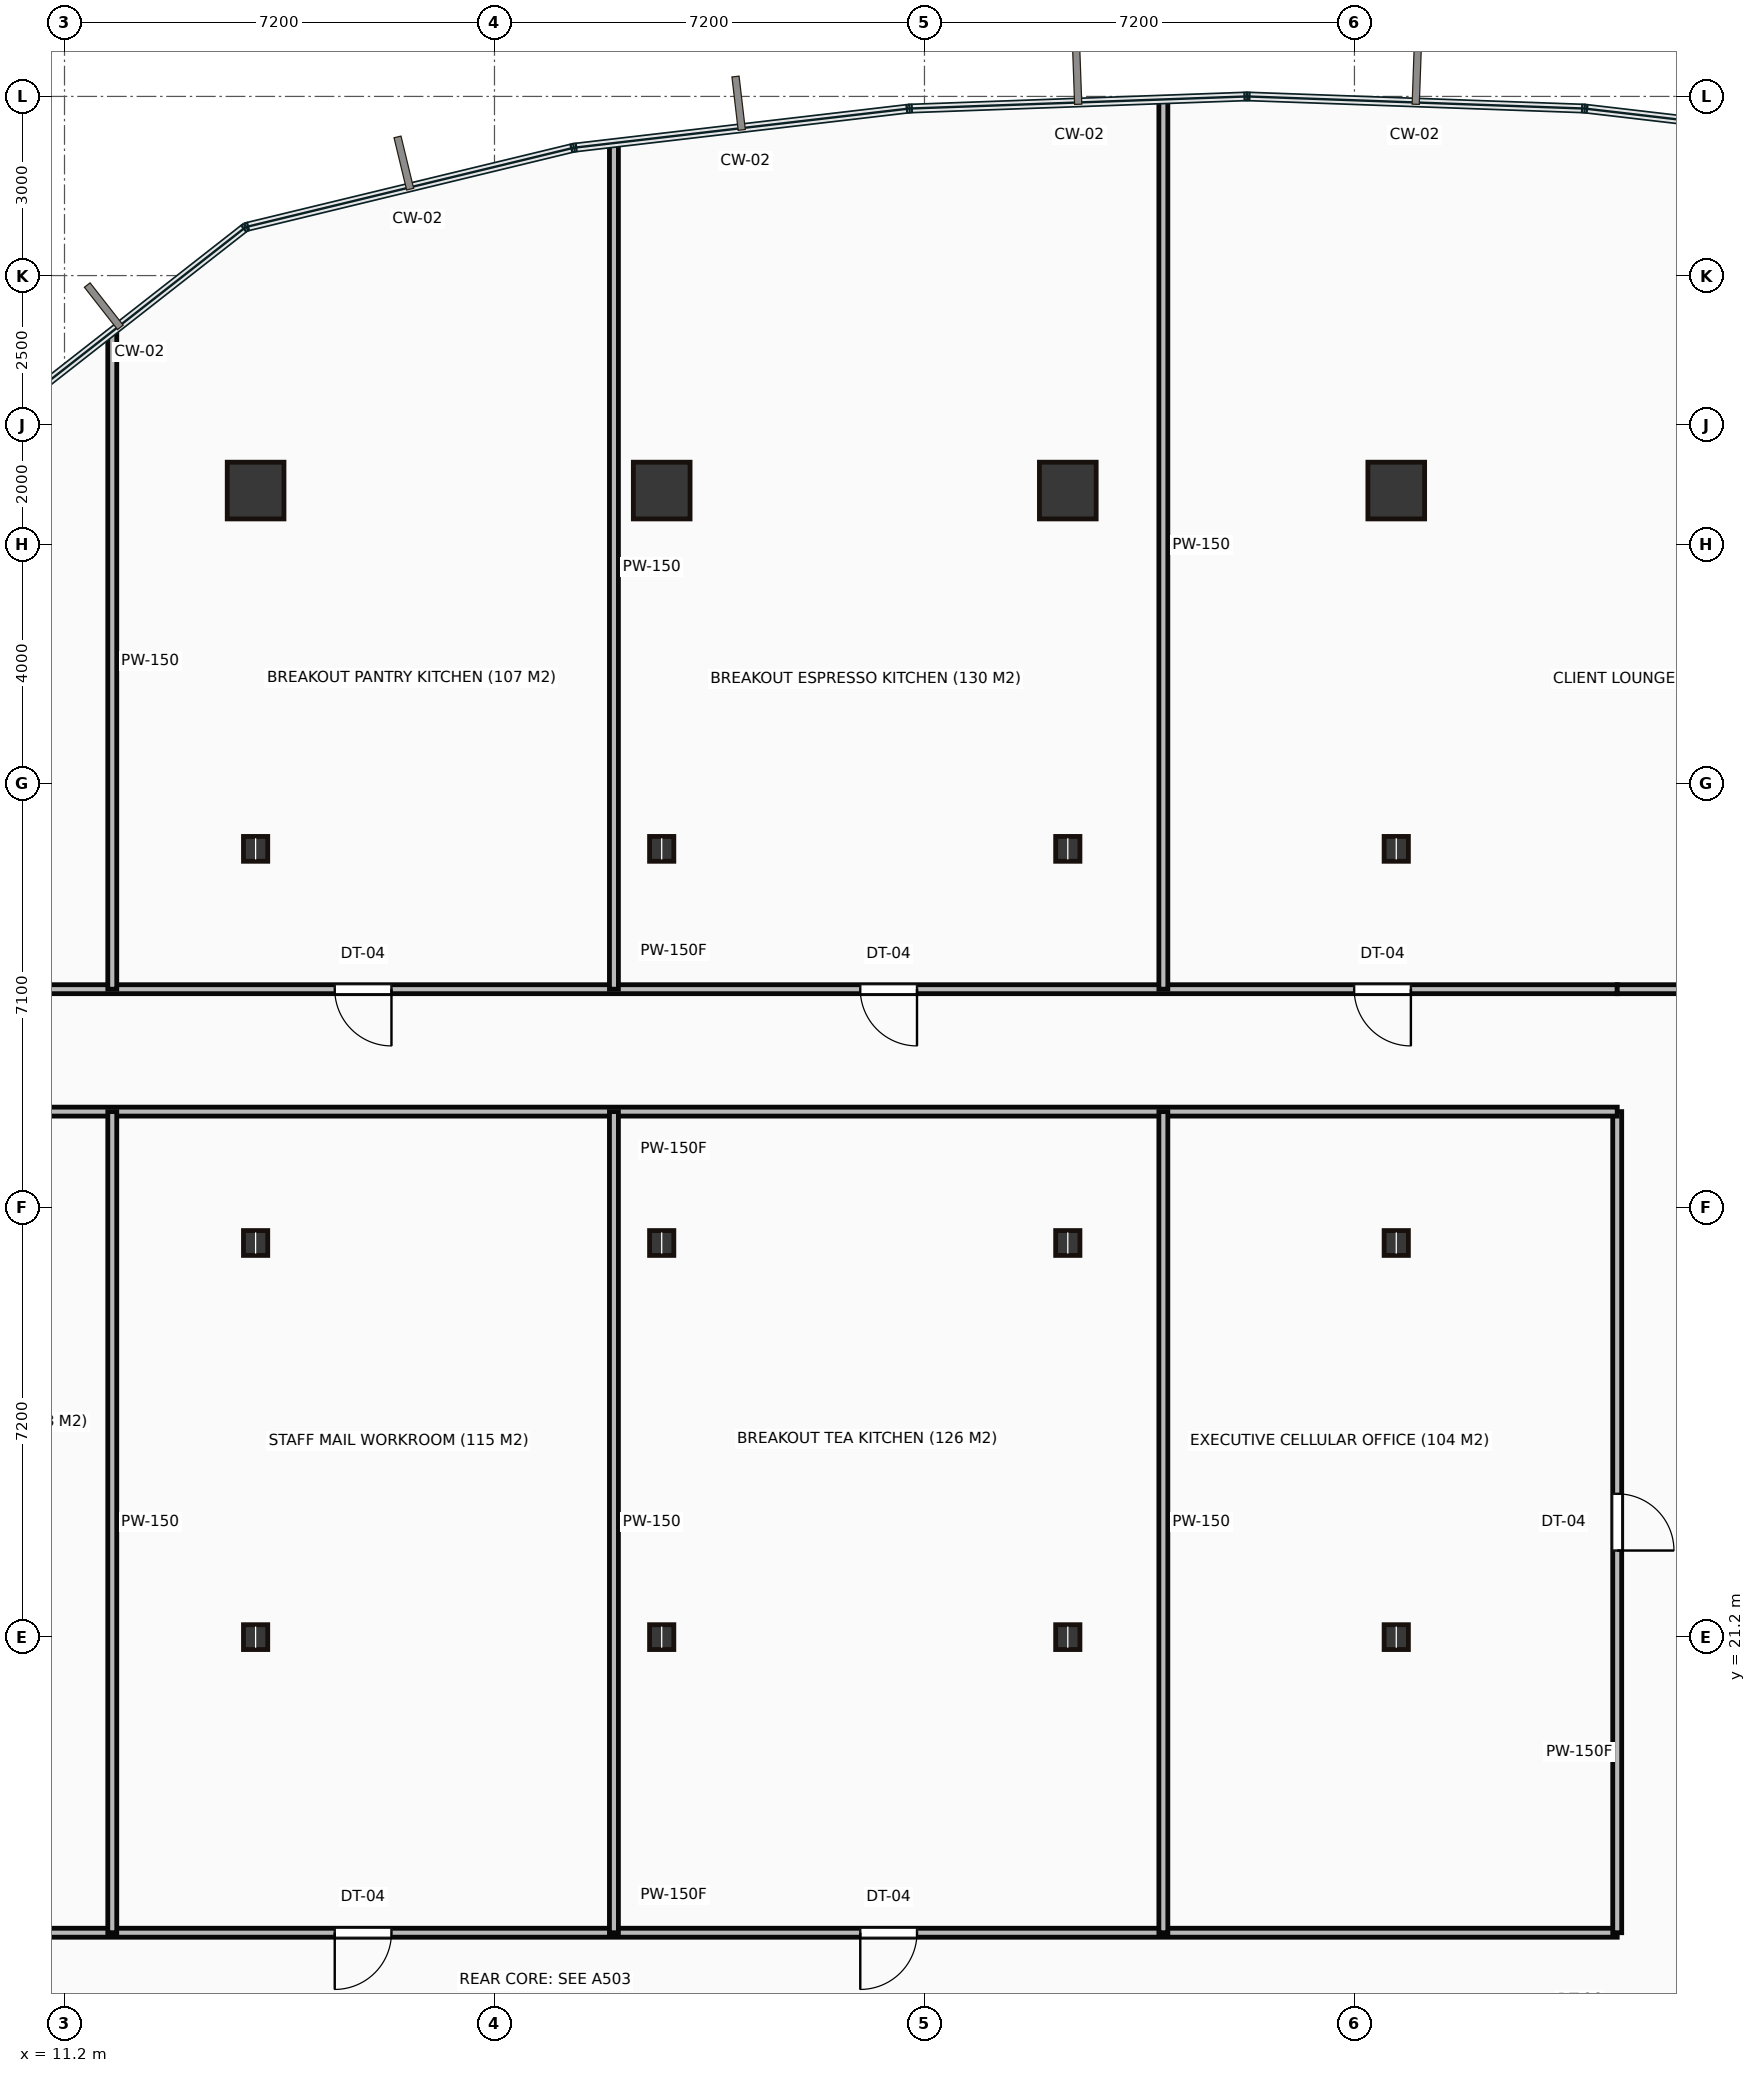
"""IFC4 building model, lengths in metres.
Left out: names, types, materials, properties, quantities, classifications, styles, units other than length and angle.
Written with IfcOpenShell. Run it as: python <this file> out.ifc"""

import sys

from ifc_helpers import new_model, si_unit, direction, frame, frame_2d, origin, origin_2d, place, context, subcontext, project, spatial, rectangle, hollow_rectangle, i_section, extrude, source, transform, mapped, element, fill, save


model = new_model("IFC4")
c1 = context("Model", 3, precision=1e-05, world=origin(), true_north=direction((0.0, 1.0)))
c2 = subcontext(c1, "Body", "Model", "MODEL_VIEW")
j1 = project(units=[si_unit("LENGTHUNIT", "METRE"), si_unit("PLANEANGLEUNIT", "RADIAN")], contexts=[c1])
p1 = place(None, origin())
s1 = spatial("IfcSite", under=j1, at=p1, CompositionType="ELEMENT")
p2 = place(p1, origin())
s2 = spatial("IfcBuilding", under=s1, at=p2, CompositionType="ELEMENT")
p3 = place(p2, frame((0.0, 0.0, 65.35)))
s3 = spatial("IfcBuildingStorey", under=s2, at=p3, CompositionType="ELEMENT", Elevation=65.35)
m1 = source(origin(), c2, "Body", "SweptSolid", [
    extrude(i_section(OverallWidth=0.406, OverallDepth=0.416, WebThickness=0.03, FlangeThickness=0.048, at=origin_2d()), origin(), (0.0, 0.0, 1.0), 3.65),
])
for number, where, z_axis, x_axis in (
    (1, (14.4, 21.2, 0.0), (0.0, 0.0, 1.0), (1.0, 0.0, 0.0)),
    (2, (14.4, 27.8, 0.0), (0.0, 0.0, 1.0), (1.0, 0.0, 0.0)),
    (3, (14.4, 34.4, 0.0), (0.0, 0.0, 1.0), (1.0, 0.0, 0.0)),
):
    element("IfcColumn", number, at=place(p3, frame(where, z_axis=z_axis, x_axis=x_axis)), inside=s3, PredefinedType="COLUMN", context=c2, shape_type="MappedRepresentation", body=[
        mapped(m1, transform((0.0, 0.0, 0.0))),
    ])
m2 = source(origin(), c2, "Body", "SweptSolid", [
    extrude(hollow_rectangle(XDim=0.95, YDim=0.95, WallThickness=0.045, at=origin_2d()), origin(), (0.0, 0.0, 1.0), 3.65),
])
p4 = place(p3, frame((14.4, 40.4, 0.0), z_axis=(0.0, 0.0, 1.0), x_axis=(1.0, 0.0, 0.0)))
e4 = element("IfcColumn", 4, at=p4, inside=s3, PredefinedType="COLUMN", context=c2, shape_type="MappedRepresentation", body=[
    mapped(m2, transform((0.0, 0.0, 0.0))),
])
for number, where, z_axis, x_axis in (
    (5, (21.2, 21.2, 0.0), (0.0, 0.0, 1.0), (1.0, 0.0, 0.0)),
    (6, (21.2, 27.8, 0.0), (0.0, 0.0, 1.0), (1.0, 0.0, 0.0)),
    (7, (21.2, 34.4, 0.0), (0.0, 0.0, 1.0), (1.0, 0.0, 0.0)),
):
    element("IfcColumn", number, at=place(p3, frame(where, z_axis=z_axis, x_axis=x_axis)), inside=s3, PredefinedType="COLUMN", context=c2, shape_type="MappedRepresentation", body=[
        mapped(m1, transform((0.0, 0.0, 0.0))),
    ])
p5 = place(p3, frame((21.2, 40.4, 0.0), z_axis=(0.0, 0.0, 1.0), x_axis=(1.0, 0.0, 0.0)))
e8 = element("IfcColumn", 8, at=p5, inside=s3, PredefinedType="COLUMN", context=c2, shape_type="MappedRepresentation", body=[
    mapped(m2, transform((0.0, 0.0, 0.0))),
])
for number, where, z_axis, x_axis in (
    (9, (28.0, 21.2, 0.0), (0.0, 0.0, 1.0), (1.0, 0.0, 0.0)),
    (10, (28.0, 27.8, 0.0), (0.0, 0.0, 1.0), (1.0, 0.0, 0.0)),
    (11, (28.0, 34.4, 0.0), (0.0, 0.0, 1.0), (1.0, 0.0, 0.0)),
):
    element("IfcColumn", number, at=place(p3, frame(where, z_axis=z_axis, x_axis=x_axis)), inside=s3, PredefinedType="COLUMN", context=c2, shape_type="MappedRepresentation", body=[
        mapped(m1, transform((0.0, 0.0, 0.0))),
    ])
p6 = place(p3, frame((28.0, 40.4, 0.0), z_axis=(0.0, 0.0, 1.0), x_axis=(1.0, 0.0, 0.0)))
e12 = element("IfcColumn", 12, at=p6, inside=s3, PredefinedType="COLUMN", context=c2, shape_type="MappedRepresentation", body=[
    mapped(m2, transform((0.0, 0.0, 0.0))),
])
for number, where, z_axis, x_axis in (
    (13, (33.5, 21.2, 0.0), (0.0, 0.0, 1.0), (1.0, 0.0, 0.0)),
    (14, (33.5, 27.8, 0.0), (0.0, 0.0, 1.0), (1.0, 0.0, 0.0)),
    (15, (33.5, 34.4, 0.0), (0.0, 0.0, 1.0), (1.0, 0.0, 0.0)),
):
    element("IfcColumn", number, at=place(p3, frame(where, z_axis=z_axis, x_axis=x_axis)), inside=s3, PredefinedType="COLUMN", context=c2, shape_type="MappedRepresentation", body=[
        mapped(m1, transform((0.0, 0.0, 0.0))),
    ])
p7 = place(p3, frame((33.5, 40.4, 0.0), z_axis=(0.0, 0.0, 1.0), x_axis=(1.0, 0.0, 0.0)))
e16 = element("IfcColumn", 16, at=p7, inside=s3, PredefinedType="COLUMN", context=c2, shape_type="MappedRepresentation", body=[
    mapped(m2, transform((0.0, 0.0, 0.0))),
])
m3 = source(origin(), c2, "Body", "SweptSolid", [
    extrude(rectangle(XDim=31.6, YDim=0.15, at=frame_2d((15.8, 0.0))), origin(), (0.0, 0.0, 1.0), 3.4),
])
p8 = place(p3, frame((5.6, 32.05, 0.0), z_axis=(0.0, 0.0, 1.0), x_axis=(1.0, 0.0, 0.0)))
e17 = element("IfcWall", 17, at=p8, inside=s3, PredefinedType="PARTITIONING", context=c2, shape_type="MappedRepresentation", body=[
    mapped(m3, transform((0.0, 0.0, 0.0))),
])
p9 = place(p8, frame((2.855, 0.0, 0.0)))
e18 = element("IfcOpeningElement", 18, at=p9, cuts=e17, PredefinedType="OPENING", context=c2, shape_type="SweptSolid", body=[
    extrude(rectangle(XDim=0.95, YDim=2.15, at=frame_2d((0.475, 1.075))), frame((0.0, 0.085, 0.0), z_axis=(0.0, -1.0, 0.0), x_axis=(1.0, 0.0, 0.0)), (0.0, 0.0, 1.0), 0.17),
])
p10 = place(p8, frame((10.125, 0.0, 0.0)))
e19 = element("IfcOpeningElement", 19, at=p10, cuts=e17, PredefinedType="OPENING", context=c2, shape_type="SweptSolid", body=[
    extrude(rectangle(XDim=0.95, YDim=2.15, at=frame_2d((0.475, 1.075))), frame((0.0, 0.085, 0.0), z_axis=(0.0, -1.0, 0.0), x_axis=(1.0, 0.0, 0.0)), (0.0, 0.0, 1.0), 0.17),
])
p11 = place(p8, frame((18.925, 0.0, 0.0)))
e20 = element("IfcOpeningElement", 20, at=p11, cuts=e17, PredefinedType="OPENING", context=c2, shape_type="SweptSolid", body=[
    extrude(rectangle(XDim=0.95, YDim=2.15, at=frame_2d((0.475, 1.075))), frame((0.0, 0.085, 0.0), z_axis=(0.0, -1.0, 0.0), x_axis=(1.0, 0.0, 0.0)), (0.0, 0.0, 1.0), 0.17),
])
p12 = place(p8, frame((27.195, 0.0, 0.0)))
e21 = element("IfcOpeningElement", 21, at=p12, cuts=e17, PredefinedType="OPENING", context=c2, shape_type="SweptSolid", body=[
    extrude(rectangle(XDim=0.95, YDim=2.15, at=frame_2d((0.475, 1.075))), frame((0.0, 0.085, 0.0), z_axis=(0.0, -1.0, 0.0), x_axis=(1.0, 0.0, 0.0)), (0.0, 0.0, 1.0), 0.17),
])
m4 = source(origin(), c2, "Body", "SweptSolid", [
    extrude(rectangle(XDim=2.2, YDim=0.15, at=frame_2d((1.1, 0.0))), origin(), (0.0, 0.0, 1.0), 3.4),
])
p13 = place(p3, frame((37.2, 32.05, 0.0), z_axis=(0.0, 0.0, 1.0), x_axis=(1.0, 0.0, 0.0)))
e22 = element("IfcWall", 22, at=p13, inside=s3, PredefinedType="PARTITIONING", context=c2, shape_type="MappedRepresentation", body=[
    mapped(m4, transform((0.0, 0.0, 0.0))),
])
p14 = place(p3, frame((5.6, 16.25, 0.0), z_axis=(0.0, 0.0, 1.0), x_axis=(1.0, 0.0, 0.0)))
e23 = element("IfcWall", 23, at=p14, inside=s3, PredefinedType="PARTITIONING", context=c2, shape_type="MappedRepresentation", body=[
    mapped(m3, transform((0.0, 0.0, 0.0))),
])
p15 = place(p14, frame((10.125, 0.0, 0.0)))
e24 = element("IfcOpeningElement", 24, at=p15, cuts=e23, PredefinedType="OPENING", context=c2, shape_type="SweptSolid", body=[
    extrude(rectangle(XDim=0.95, YDim=2.15, at=frame_2d((0.475, 1.075))), frame((0.0, 0.085, 0.0), z_axis=(0.0, -1.0, 0.0), x_axis=(1.0, 0.0, 0.0)), (0.0, 0.0, 1.0), 0.17),
])
p16 = place(p14, frame((18.925, 0.0, 0.0)))
e25 = element("IfcOpeningElement", 25, at=p16, cuts=e23, PredefinedType="OPENING", context=c2, shape_type="SweptSolid", body=[
    extrude(rectangle(XDim=0.95, YDim=2.15, at=frame_2d((0.475, 1.075))), frame((0.0, 0.085, 0.0), z_axis=(0.0, -1.0, 0.0), x_axis=(1.0, 0.0, 0.0)), (0.0, 0.0, 1.0), 0.17),
])
m5 = source(origin(), c2, "Body", "SweptSolid", [
    extrude(rectangle(XDim=13.75, YDim=0.15, at=frame_2d((6.875, 0.0))), origin(), (0.0, 0.0, 1.0), 3.4),
])
p17 = place(p3, frame((37.2, 16.25, 0.0), z_axis=(0.0, 0.0, 1.0), x_axis=(0.0, 1.0, 0.0)))
e26 = element("IfcWall", 26, at=p17, inside=s3, PredefinedType="PARTITIONING", context=c2, shape_type="MappedRepresentation", body=[
    mapped(m5, transform((0.0, 0.0, 0.0))),
])
p18 = place(p17, frame((6.4, 0.0, 0.0)))
e27 = element("IfcOpeningElement", 27, at=p18, cuts=e26, PredefinedType="OPENING", context=c2, shape_type="SweptSolid", body=[
    extrude(rectangle(XDim=0.95, YDim=2.15, at=frame_2d((0.475, 1.075))), frame((0.0, 0.085, 0.0), z_axis=(0.0, -1.0, 0.0), x_axis=(1.0, 0.0, 0.0)), (0.0, 0.0, 1.0), 0.17),
])
m6 = source(origin(), c2, "Body", "SweptSolid", [
    extrude(rectangle(XDim=31.6, YDim=0.15, at=frame_2d((15.8, 0.0))), origin(), (0.0, 0.0, 1.0), 2.978),
])
p19 = place(p3, frame((37.2, 30.0, 0.0), z_axis=(0.0, 0.0, 1.0), x_axis=(-1.0, 0.0, 0.0)))
e28 = element("IfcWall", 28, at=p19, inside=s3, PredefinedType="PARTITIONING", context=c2, shape_type="MappedRepresentation", body=[
    mapped(m6, transform((0.0, 0.0, 0.0))),
])
p20 = place(p3, frame((12.0, 30.0, 0.0), z_axis=(0.0, 0.0, 1.0), x_axis=(0.0, -1.0, 0.0)))
e29 = element("IfcWall", 29, at=p20, inside=s3, PredefinedType="PARTITIONING", context=c2, shape_type="MappedRepresentation", body=[
    mapped(m5, transform((0.0, 0.0, 0.0))),
])
m7 = source(origin(), c2, "Body", "SweptSolid", [
    extrude(rectangle(XDim=10.989, YDim=0.15, at=frame_2d((5.495, 0.0))), origin(), (0.0, 0.0, 1.0), 3.4),
])
p21 = place(p3, frame((12.0, 43.039, 0.0), z_axis=(0.0, 0.0, 1.0), x_axis=(0.0, -1.0, 0.0)))
e30 = element("IfcWall", 30, at=p21, inside=s3, PredefinedType="PARTITIONING", context=c2, shape_type="MappedRepresentation", body=[
    mapped(m7, transform((0.0, 0.0, 0.0))),
])
p22 = place(p3, frame((20.4, 30.0, 0.0), z_axis=(0.0, 0.0, 1.0), x_axis=(0.0, -1.0, 0.0)))
e31 = element("IfcWall", 31, at=p22, inside=s3, PredefinedType="PARTITIONING", context=c2, shape_type="MappedRepresentation", body=[
    mapped(m5, transform((0.0, 0.0, 0.0))),
])
m8 = source(origin(), c2, "Body", "SweptSolid", [
    extrude(rectangle(XDim=14.149, YDim=0.15, at=frame_2d((7.074, 0.0))), origin(), (0.0, 0.0, 1.0), 3.4),
])
p23 = place(p3, frame((20.4, 46.199, 0.0), z_axis=(0.0, 0.0, 1.0), x_axis=(0.0, -1.0, 0.0)))
e32 = element("IfcWall", 32, at=p23, inside=s3, PredefinedType="PARTITIONING", context=c2, shape_type="MappedRepresentation", body=[
    mapped(m8, transform((0.0, 0.0, 0.0))),
])
p24 = place(p3, frame((29.6, 30.0, 0.0), z_axis=(0.0, 0.0, 1.0), x_axis=(0.0, -1.0, 0.0)))
e33 = element("IfcWall", 33, at=p24, inside=s3, PredefinedType="PARTITIONING", context=c2, shape_type="MappedRepresentation", body=[
    mapped(m5, transform((0.0, 0.0, 0.0))),
])
m9 = source(origin(), c2, "Body", "SweptSolid", [
    extrude(rectangle(XDim=14.88, YDim=0.15, at=frame_2d((7.44, 0.0))), origin(), (0.0, 0.0, 1.0), 3.4),
])
p25 = place(p3, frame((29.6, 46.93, 0.0), z_axis=(0.0, 0.0, 1.0), x_axis=(0.0, -1.0, 0.0)))
e34 = element("IfcWall", 34, at=p25, inside=s3, PredefinedType="PARTITIONING", context=c2, shape_type="MappedRepresentation", body=[
    mapped(m9, transform((0.0, 0.0, 0.0))),
])
m10 = source(origin(), c2, "Body", "SweptSolid", [
    extrude(rectangle(XDim=0.95, YDim=2.15, at=frame_2d((0.475, 1.075))), frame((0.0, 0.025, 0.0), z_axis=(0.0, -1.0, 0.0), x_axis=(1.0, 0.0, 0.0)), (0.0, 0.0, 1.0), 0.05),
])
p26 = place(p15, origin())
e35 = element("IfcDoor", 35, at=p26, inside=s3, OperationType="SINGLE_SWING_LEFT", PredefinedType="DOOR", context=c2, shape_type="MappedRepresentation", body=[
    mapped(m10, transform((0.0, 0.0, 0.0))),
])
fill(e24, e35)
p27 = place(p10, origin())
e36 = element("IfcDoor", 36, at=p27, inside=s3, OperationType="SINGLE_SWING_RIGHT", PredefinedType="DOOR", context=c2, shape_type="MappedRepresentation", body=[
    mapped(m10, transform((0.0, 0.0, 0.0))),
])
fill(e19, e36)
p28 = place(p16, origin())
e37 = element("IfcDoor", 37, at=p28, inside=s3, OperationType="SINGLE_SWING_LEFT", PredefinedType="DOOR", context=c2, shape_type="MappedRepresentation", body=[
    mapped(m10, transform((0.0, 0.0, 0.0))),
])
fill(e25, e37)
p29 = place(p11, origin())
e38 = element("IfcDoor", 38, at=p29, inside=s3, OperationType="SINGLE_SWING_RIGHT", PredefinedType="DOOR", context=c2, shape_type="MappedRepresentation", body=[
    mapped(m10, transform((0.0, 0.0, 0.0))),
])
fill(e20, e38)
p30 = place(p18, origin())
e39 = element("IfcDoor", 39, at=p30, inside=s3, OperationType="SINGLE_SWING_LEFT", PredefinedType="DOOR", context=c2, shape_type="MappedRepresentation", body=[
    mapped(m10, transform((0.0, 0.0, 0.0))),
])
fill(e27, e39)
p31 = place(p12, origin())
e40 = element("IfcDoor", 40, at=p31, inside=s3, OperationType="SINGLE_SWING_RIGHT", PredefinedType="DOOR", context=c2, shape_type="MappedRepresentation", body=[
    mapped(m10, transform((0.0, 0.0, 0.0))),
])
fill(e21, e40)
save(model, sys.argv[1])
